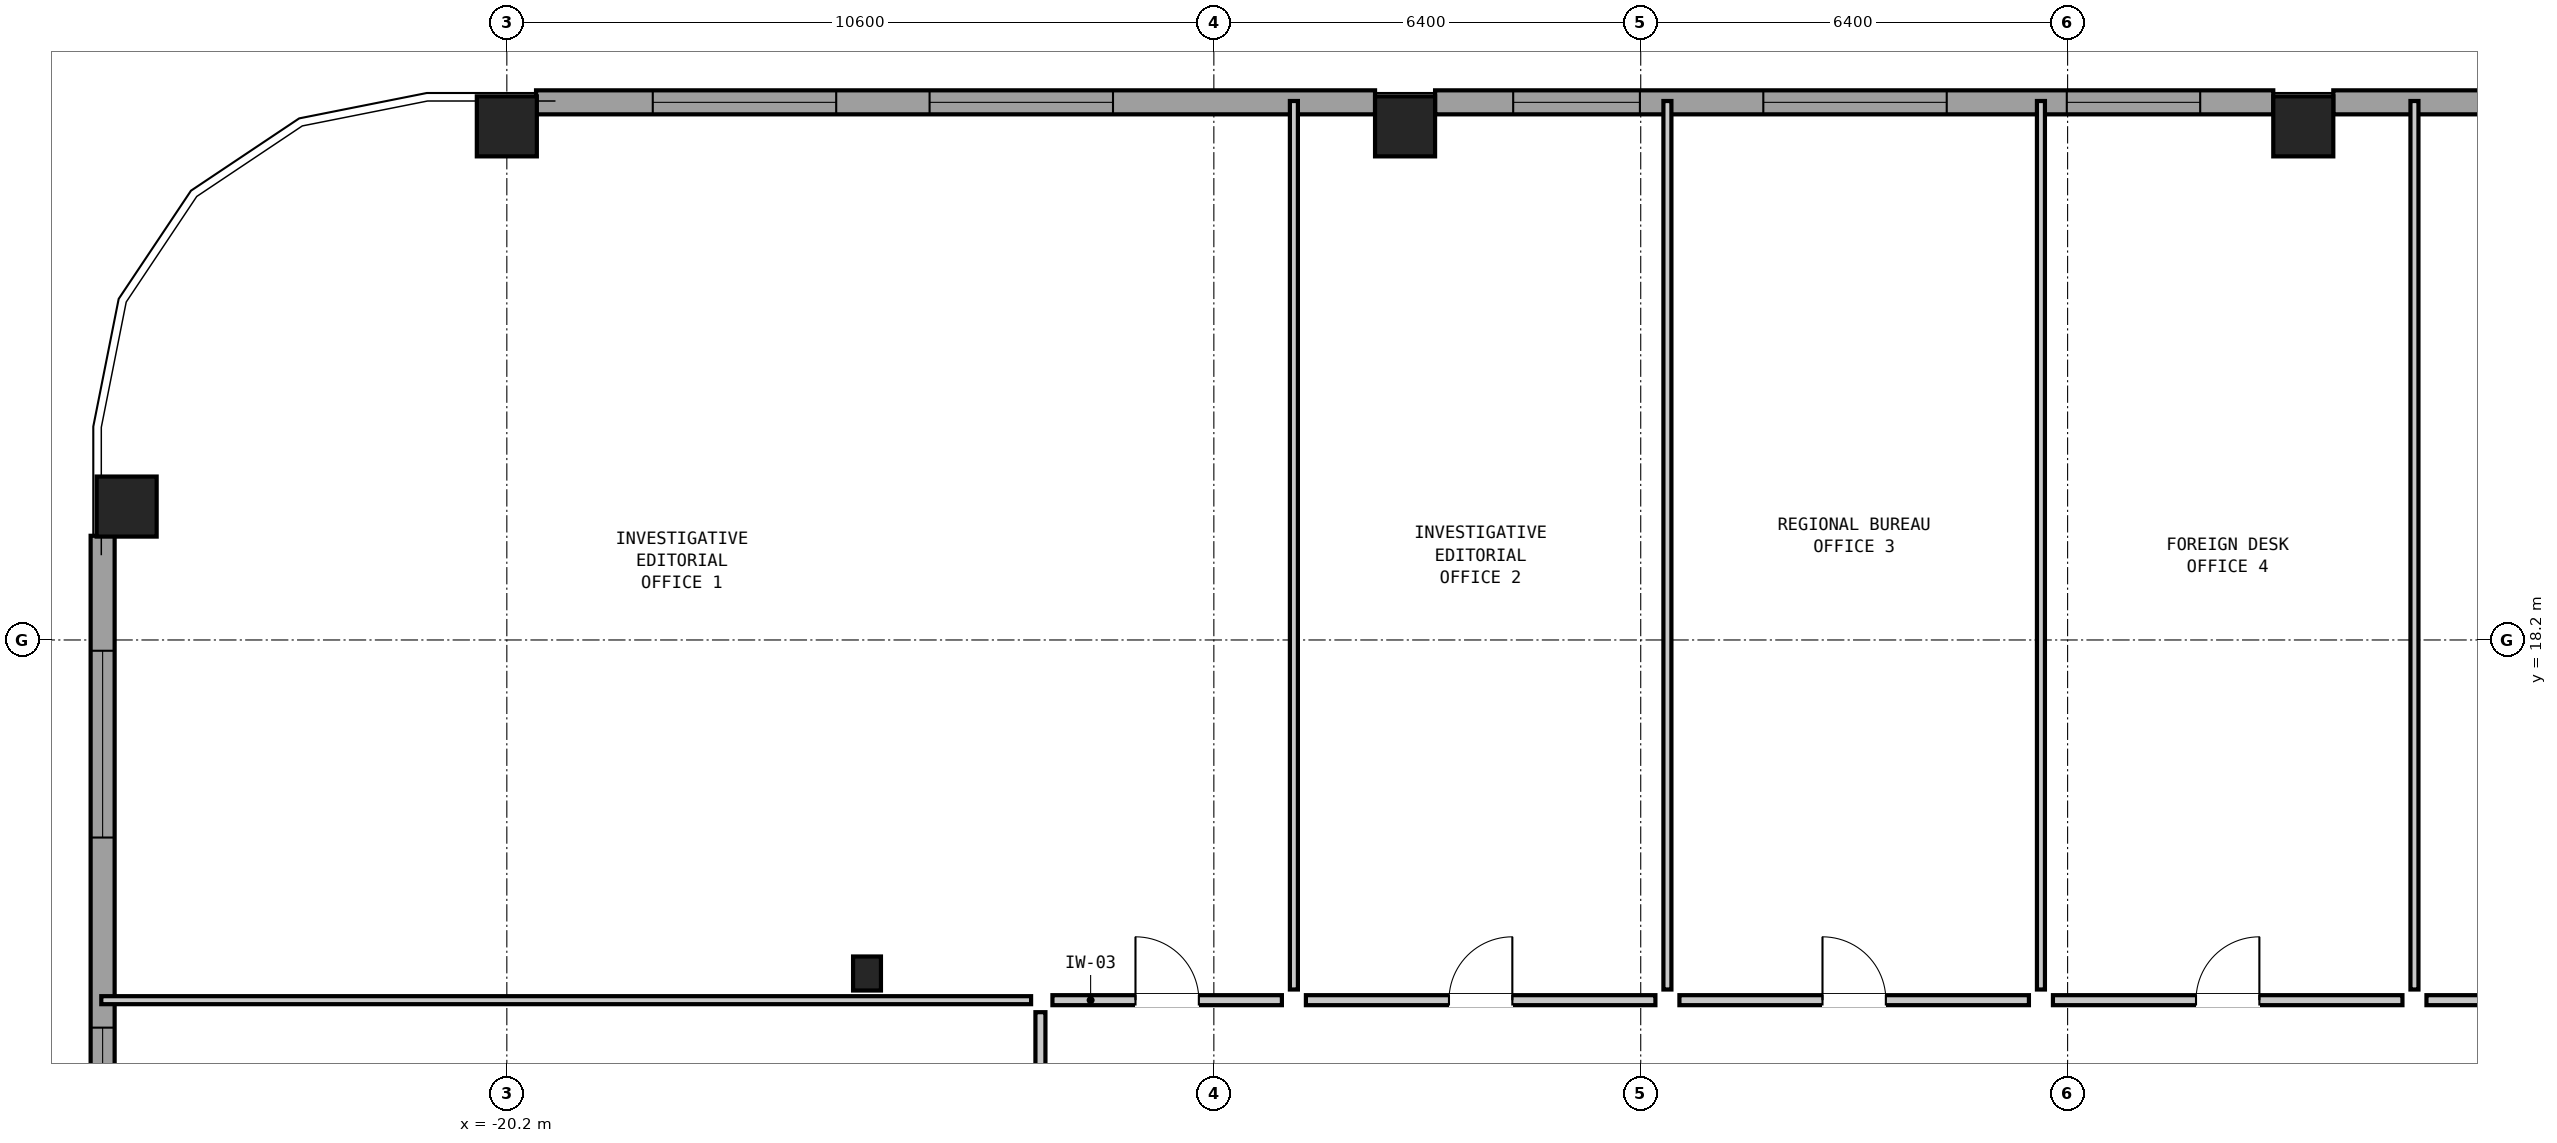
"""IFC4 building model, lengths in metres.
Left out: names, types, materials, properties, quantities, classifications, styles, units other than length and angle.
Written with IfcOpenShell. Run it as: python <this file> out.ifc"""

import sys

from ifc_helpers import new_model, si_unit, direction, frame, frame_2d, origin, origin_2d, place, context, subcontext, project, spatial, rectangle, hollow_rectangle, i_section, extrude, element, fill, save


model = new_model("IFC4")
c1 = context("Model", 3, precision=1e-05, world=origin(), true_north=direction((0.0, 1.0)))
c2 = subcontext(c1, "Body", "Model", "MODEL_VIEW")
j1 = project(units=[si_unit("LENGTHUNIT", "METRE"), si_unit("PLANEANGLEUNIT", "RADIAN")], contexts=[c1])
p1 = place(None, origin())
s1 = spatial("IfcSite", under=j1, at=p1, CompositionType="ELEMENT")
p2 = place(p1, origin())
s2 = spatial("IfcBuilding", under=s1, at=p2, CompositionType="ELEMENT")
p3 = place(p2, frame((0.0, 0.0, 35.25)))
s3 = spatial("IfcBuildingStorey", under=s2, at=p3, CompositionType="ELEMENT", Elevation=35.25)
for number, where, z_axis, x_axis in (
    (1, (6.733, 25.9, 0.0), (0.0, 0.0, 1.0), (1.0, 0.0, 0.0)),
    (2, (-6.733, 25.9, 0.0), (0.0, 0.0, 1.0), (1.0, 0.0, 0.0)),
    (3, (-20.2, 25.9, 0.0), (0.0, 0.0, 1.0), (1.0, 0.0, 0.0)),
    (4, (-25.9, 20.2, 0.0), (0.0, 0.0, 1.0), (0.0, 1.0, 0.0)),
):
    element("IfcColumn", number, at=place(p3, frame(where, z_axis=z_axis, x_axis=x_axis)), inside=s3, PredefinedType="COLUMN", context=c2, shape_type="SweptSolid", body=[
        extrude(hollow_rectangle(XDim=0.9, YDim=0.9, WallThickness=0.055, at=origin_2d()), origin(), (0.0, 0.0, 1.0), 3.05),
    ])
p4 = place(p3, frame((-14.8, 13.2, 0.0), z_axis=(0.0, 0.0, 1.0), x_axis=(1.0, 0.0, 0.0)))
e5 = element("IfcColumn", 5, at=p4, inside=s3, PredefinedType="COLUMN", context=c2, shape_type="SweptSolid", body=[
    extrude(i_section(OverallWidth=0.418, OverallDepth=0.51, WebThickness=0.042, FlangeThickness=0.068, at=origin_2d()), origin(), (0.0, 0.0, 1.0), 3.05),
])
p5 = place(p3, frame((-19.762, 26.26, 0.0), z_axis=(0.0, 0.0, 1.0), x_axis=(1.0, 0.0, 0.0)))
e6 = element("IfcWall", 6, at=p5, inside=s3, PredefinedType="SOLIDWALL", context=c2, shape_type="SweptSolid", body=[
    extrude(rectangle(XDim=12.579, YDim=0.36, at=frame_2d((6.289, 0.0))), origin(), (0.0, 0.0, 1.0), 2.067),
])
p6 = place(p5, frame((1.75, 0.0, 0.2)))
e7 = element("IfcOpeningElement", 7, at=p6, cuts=e6, PredefinedType="OPENING", context=c2, shape_type="SweptSolid", body=[
    extrude(rectangle(XDim=2.75, YDim=0.95, at=frame_2d((1.375, 0.475))), frame((0.0, 0.192, 0.0), z_axis=(0.0, -1.0, 0.0), x_axis=(1.0, 0.0, 0.0)), (0.0, 0.0, 1.0), 0.384),
])
p7 = place(p5, frame((5.9, 0.0, 0.95)))
e8 = element("IfcOpeningElement", 8, at=p7, cuts=e6, PredefinedType="OPENING", context=c2, shape_type="SweptSolid", body=[
    extrude(rectangle(XDim=2.75, YDim=0.95, at=frame_2d((1.375, 0.475))), frame((0.0, 0.192, 0.0), z_axis=(0.0, -1.0, 0.0), x_axis=(1.0, 0.0, 0.0)), (0.0, 0.0, 1.0), 0.384),
])
p8 = place(p3, frame((-6.283, 26.26, 0.0), z_axis=(0.0, 0.0, 1.0), x_axis=(1.0, 0.0, 0.0)))
e9 = element("IfcWall", 9, at=p8, inside=s3, PredefinedType="SOLIDWALL", context=c2, shape_type="SweptSolid", body=[
    extrude(rectangle(XDim=12.566, YDim=0.36, at=frame_2d((6.283, 0.0))), origin(), (0.0, 0.0, 1.0), 2.067),
])
p9 = place(p8, frame((1.171, 0.0, 0.65)))
e10 = element("IfcOpeningElement", 10, at=p9, cuts=e9, PredefinedType="OPENING", context=c2, shape_type="SweptSolid", body=[
    extrude(rectangle(XDim=1.9, YDim=1.25, at=frame_2d((0.95, 0.625))), frame((0.0, 0.192, 0.0), z_axis=(0.0, -1.0, 0.0), x_axis=(1.0, 0.0, 0.0)), (0.0, 0.0, 1.0), 0.384),
])
p10 = place(p8, frame((4.921, 0.0, 0.2)))
e11 = element("IfcOpeningElement", 11, at=p10, cuts=e9, PredefinedType="OPENING", context=c2, shape_type="SweptSolid", body=[
    extrude(rectangle(XDim=2.75, YDim=0.95, at=frame_2d((1.375, 0.475))), frame((0.0, 0.192, 0.0), z_axis=(0.0, -1.0, 0.0), x_axis=(1.0, 0.0, 0.0)), (0.0, 0.0, 1.0), 0.384),
])
p11 = place(p8, frame((9.471, 0.0, 0.7)))
e12 = element("IfcOpeningElement", 12, at=p11, cuts=e9, PredefinedType="OPENING", context=c2, shape_type="SweptSolid", body=[
    extrude(rectangle(XDim=2.0, YDim=1.2, at=frame_2d((1.0, 0.6))), frame((0.0, 0.192, 0.0), z_axis=(0.0, -1.0, 0.0), x_axis=(1.0, 0.0, 0.0)), (0.0, 0.0, 1.0), 0.384),
])
p12 = place(p3, frame((7.183, 26.26, 0.0), z_axis=(0.0, 0.0, 1.0), x_axis=(1.0, 0.0, 0.0)))
e13 = element("IfcWall", 13, at=p12, inside=s3, PredefinedType="SOLIDWALL", context=c2, shape_type="SweptSolid", body=[
    extrude(rectangle(XDim=12.579, YDim=0.36, at=frame_2d((6.289, 0.0))), origin(), (0.0, 0.0, 1.0), 2.067),
])
p13 = place(p12, frame((3.905, 0.0, 0.95)))
e14 = element("IfcOpeningElement", 14, at=p13, cuts=e13, PredefinedType="OPENING", context=c2, shape_type="SweptSolid", body=[
    extrude(rectangle(XDim=2.75, YDim=0.95, at=frame_2d((1.375, 0.475))), frame((0.0, 0.192, 0.0), z_axis=(0.0, -1.0, 0.0), x_axis=(1.0, 0.0, 0.0)), (0.0, 0.0, 1.0), 0.384),
])
p14 = place(p12, frame((8.005, 0.0, 0.2)))
e15 = element("IfcOpeningElement", 15, at=p14, cuts=e13, PredefinedType="OPENING", context=c2, shape_type="SweptSolid", body=[
    extrude(rectangle(XDim=2.9, YDim=0.9, at=frame_2d((1.45, 0.45))), frame((0.0, 0.192, 0.0), z_axis=(0.0, -1.0, 0.0), x_axis=(1.0, 0.0, 0.0)), (0.0, 0.0, 1.0), 0.384),
])
p15 = place(p3, frame((-26.26, 7.183, 0.0), z_axis=(0.0, 0.0, 1.0), x_axis=(0.0, 1.0, 0.0)))
e16 = element("IfcWall", 16, at=p15, inside=s3, PredefinedType="SOLIDWALL", context=c2, shape_type="SweptSolid", body=[
    extrude(rectangle(XDim=12.579, YDim=0.36, at=frame_2d((6.289, 0.0))), origin(), (0.0, 0.0, 1.0), 2.067),
])
p16 = place(p15, frame((0.055, 0.0, 0.2)))
e17 = element("IfcOpeningElement", 17, at=p16, cuts=e16, PredefinedType="OPENING", context=c2, shape_type="SweptSolid", body=[
    extrude(rectangle(XDim=2.25, YDim=1.15, at=frame_2d((1.125, 0.575))), frame((0.0, 0.192, 0.0), z_axis=(0.0, -1.0, 0.0), x_axis=(1.0, 0.0, 0.0)), (0.0, 0.0, 1.0), 0.384),
])
p17 = place(p15, frame((3.805, 0.0, 0.95)))
e18 = element("IfcOpeningElement", 18, at=p17, cuts=e16, PredefinedType="OPENING", context=c2, shape_type="SweptSolid", body=[
    extrude(rectangle(XDim=1.4, YDim=0.95, at=frame_2d((0.7, 0.475))), frame((0.0, 0.192, 0.0), z_axis=(0.0, -1.0, 0.0), x_axis=(1.0, 0.0, 0.0)), (0.0, 0.0, 1.0), 0.384),
])
p18 = place(p15, frame((8.055, 0.0, 0.2)))
e19 = element("IfcOpeningElement", 19, at=p18, cuts=e16, PredefinedType="OPENING", context=c2, shape_type="SweptSolid", body=[
    extrude(rectangle(XDim=2.8, YDim=1.0, at=frame_2d((1.4, 0.5))), frame((0.0, 0.192, 0.0), z_axis=(0.0, -1.0, 0.0), x_axis=(1.0, 0.0, 0.0)), (0.0, 0.0, 1.0), 0.384),
])
p19 = place(p3, frame((-26.28, 12.8, 0.0), z_axis=(0.0, 0.0, 1.0), x_axis=(1.0, 0.0, 0.0)))
e20 = element("IfcWall", 20, at=p19, inside=s3, PredefinedType="PARTITIONING", context=c2, shape_type="SweptSolid", body=[
    extrude(rectangle(XDim=13.94, YDim=0.12, at=frame_2d((6.97, 0.0))), origin(), (0.0, 0.0, 1.0), 2.83),
])
p20 = place(p3, frame((-8.4, 12.96, 0.0), z_axis=(0.0, 0.0, 1.0), x_axis=(0.0, 1.0, 0.0)))
e21 = element("IfcWall", 21, at=p20, inside=s3, PredefinedType="PARTITIONING", context=c2, shape_type="SweptSolid", body=[
    extrude(rectangle(XDim=13.32, YDim=0.12, at=frame_2d((6.66, 0.0))), origin(), (0.0, 0.0, 1.0), 2.83),
])
for number, where, z_axis, x_axis in (
    (22, (-2.8, 12.96, 0.0), (0.0, 0.0, 1.0), (0.0, 1.0, 0.0)),
    (23, (2.8, 12.96, 0.0), (0.0, 0.0, 1.0), (0.0, 1.0, 0.0)),
):
    element("IfcWall", number, at=place(p3, frame(where, z_axis=z_axis, x_axis=x_axis)), inside=s3, PredefinedType="PARTITIONING", context=c2, shape_type="SweptSolid", body=[
        extrude(rectangle(XDim=13.32, YDim=0.12, at=frame_2d((6.66, 0.0))), origin(), (0.0, 0.0, 1.0), 2.274),
    ])
p21 = place(p3, frame((8.4, 12.96, 0.0), z_axis=(0.0, 0.0, 1.0), x_axis=(0.0, 1.0, 0.0)))
e24 = element("IfcWall", 24, at=p21, inside=s3, PredefinedType="PARTITIONING", context=c2, shape_type="SweptSolid", body=[
    extrude(rectangle(XDim=13.32, YDim=0.12, at=frame_2d((6.66, 0.0))), origin(), (0.0, 0.0, 1.0), 2.83),
])
p22 = place(p3, frame((-12.02, 12.8, 0.0), z_axis=(0.0, 0.0, 1.0), x_axis=(1.0, 0.0, 0.0)))
e25 = element("IfcWall", 25, at=p22, inside=s3, PredefinedType="PARTITIONING", context=c2, shape_type="SweptSolid", body=[
    extrude(rectangle(XDim=3.44, YDim=0.15, at=frame_2d((1.72, 0.0))), origin(), (0.0, 0.0, 1.0), 2.83),
])
p23 = place(p22, frame((1.245, 0.0, 0.0)))
e26 = element("IfcOpeningElement", 26, at=p23, cuts=e25, PredefinedType="OPENING", context=c2, shape_type="SweptSolid", body=[
    extrude(rectangle(XDim=0.95, YDim=2.1, at=frame_2d((0.475, 1.05))), frame((0.0, 0.087, 0.0), z_axis=(0.0, -1.0, 0.0), x_axis=(1.0, 0.0, 0.0)), (0.0, 0.0, 1.0), 0.174),
])
p24 = place(p3, frame((-8.22, 12.8, 0.0), z_axis=(0.0, 0.0, 1.0), x_axis=(1.0, 0.0, 0.0)))
e27 = element("IfcWall", 27, at=p24, inside=s3, PredefinedType="PARTITIONING", context=c2, shape_type="SweptSolid", body=[
    extrude(rectangle(XDim=5.24, YDim=0.15, at=frame_2d((2.62, 0.0))), origin(), (0.0, 0.0, 1.0), 2.83),
])
p25 = place(p24, frame((2.145, 0.0, 0.0)))
e28 = element("IfcOpeningElement", 28, at=p25, cuts=e27, PredefinedType="OPENING", context=c2, shape_type="SweptSolid", body=[
    extrude(rectangle(XDim=0.95, YDim=2.1, at=frame_2d((0.475, 1.05))), frame((0.0, 0.087, 0.0), z_axis=(0.0, -1.0, 0.0), x_axis=(1.0, 0.0, 0.0)), (0.0, 0.0, 1.0), 0.174),
])
p26 = place(p3, frame((-2.62, 12.8, 0.0), z_axis=(0.0, 0.0, 1.0), x_axis=(1.0, 0.0, 0.0)))
e29 = element("IfcWall", 29, at=p26, inside=s3, PredefinedType="PARTITIONING", context=c2, shape_type="SweptSolid", body=[
    extrude(rectangle(XDim=5.24, YDim=0.15, at=frame_2d((2.62, 0.0))), origin(), (0.0, 0.0, 1.0), 2.83),
])
p27 = place(p26, frame((2.145, 0.0, 0.0)))
e30 = element("IfcOpeningElement", 30, at=p27, cuts=e29, PredefinedType="OPENING", context=c2, shape_type="SweptSolid", body=[
    extrude(rectangle(XDim=0.95, YDim=2.1, at=frame_2d((0.475, 1.05))), frame((0.0, 0.087, 0.0), z_axis=(0.0, -1.0, 0.0), x_axis=(1.0, 0.0, 0.0)), (0.0, 0.0, 1.0), 0.174),
])
p28 = place(p3, frame((2.98, 12.8, 0.0), z_axis=(0.0, 0.0, 1.0), x_axis=(1.0, 0.0, 0.0)))
e31 = element("IfcWall", 31, at=p28, inside=s3, PredefinedType="PARTITIONING", context=c2, shape_type="SweptSolid", body=[
    extrude(rectangle(XDim=5.24, YDim=0.15, at=frame_2d((2.62, 0.0))), origin(), (0.0, 0.0, 1.0), 2.83),
])
p29 = place(p28, frame((2.145, 0.0, 0.0)))
e32 = element("IfcOpeningElement", 32, at=p29, cuts=e31, PredefinedType="OPENING", context=c2, shape_type="SweptSolid", body=[
    extrude(rectangle(XDim=0.95, YDim=2.1, at=frame_2d((0.475, 1.05))), frame((0.0, 0.087, 0.0), z_axis=(0.0, -1.0, 0.0), x_axis=(1.0, 0.0, 0.0)), (0.0, 0.0, 1.0), 0.174),
])
p30 = place(p3, frame((8.58, 12.8, 0.0), z_axis=(0.0, 0.0, 1.0), x_axis=(1.0, 0.0, 0.0)))
e33 = element("IfcWall", 33, at=p30, inside=s3, PredefinedType="PARTITIONING", context=c2, shape_type="SweptSolid", body=[
    extrude(rectangle(XDim=3.44, YDim=0.15, at=frame_2d((1.72, 0.0))), origin(), (0.0, 0.0, 1.0), 2.83),
])
p31 = place(p30, frame((1.245, 0.0, 0.0)))
e34 = element("IfcOpeningElement", 34, at=p31, cuts=e33, PredefinedType="OPENING", context=c2, shape_type="SweptSolid", body=[
    extrude(rectangle(XDim=0.95, YDim=2.1, at=frame_2d((0.475, 1.05))), frame((0.0, 0.087, 0.0), z_axis=(0.0, -1.0, 0.0), x_axis=(1.0, 0.0, 0.0)), (0.0, 0.0, 1.0), 0.174),
])
p32 = place(p3, frame((-12.2, 0.18, 0.0), z_axis=(0.0, 0.0, 1.0), x_axis=(0.0, 1.0, 0.0)))
e35 = element("IfcWall", 35, at=p32, inside=s3, PredefinedType="PARTITIONING", context=c2, shape_type="SweptSolid", body=[
    extrude(rectangle(XDim=12.44, YDim=0.15, at=frame_2d((6.22, 0.0))), origin(), (0.0, 0.0, 1.0), 2.83),
])
p33 = place(p32, frame((5.745, 0.0, 0.0)))
e36 = element("IfcOpeningElement", 36, at=p33, cuts=e35, PredefinedType="OPENING", context=c2, shape_type="SweptSolid", body=[
    extrude(rectangle(XDim=0.95, YDim=2.1, at=frame_2d((0.475, 1.05))), frame((0.0, 0.087, 0.0), z_axis=(0.0, -1.0, 0.0), x_axis=(1.0, 0.0, 0.0)), (0.0, 0.0, 1.0), 0.174),
])
p34 = place(p6, origin())
e37 = element("IfcWindow", 37, at=p34, inside=s3, PartitioningType="SINGLE_PANEL", PredefinedType="WINDOW", context=c2, shape_type="SweptSolid", body=[
    extrude(rectangle(XDim=2.75, YDim=0.95, at=frame_2d((1.375, 0.475))), frame((0.0, 0.03, 0.0), z_axis=(0.0, -1.0, 0.0), x_axis=(1.0, 0.0, 0.0)), (0.0, 0.0, 1.0), 0.06),
])
fill(e7, e37)
p35 = place(p7, origin())
e38 = element("IfcWindow", 38, at=p35, inside=s3, PartitioningType="SINGLE_PANEL", PredefinedType="WINDOW", context=c2, shape_type="SweptSolid", body=[
    extrude(rectangle(XDim=2.75, YDim=0.95, at=frame_2d((1.375, 0.475))), frame((0.0, 0.03, 0.0), z_axis=(0.0, -1.0, 0.0), x_axis=(1.0, 0.0, 0.0)), (0.0, 0.0, 1.0), 0.06),
])
fill(e8, e38)
p36 = place(p9, origin())
e39 = element("IfcWindow", 39, at=p36, inside=s3, PartitioningType="SINGLE_PANEL", PredefinedType="WINDOW", context=c2, shape_type="SweptSolid", body=[
    extrude(rectangle(XDim=1.9, YDim=1.25, at=frame_2d((0.95, 0.625))), frame((0.0, 0.03, 0.0), z_axis=(0.0, -1.0, 0.0), x_axis=(1.0, 0.0, 0.0)), (0.0, 0.0, 1.0), 0.06),
])
fill(e10, e39)
p37 = place(p10, origin())
e40 = element("IfcWindow", 40, at=p37, inside=s3, PartitioningType="SINGLE_PANEL", PredefinedType="WINDOW", context=c2, shape_type="SweptSolid", body=[
    extrude(rectangle(XDim=2.75, YDim=0.95, at=frame_2d((1.375, 0.475))), frame((0.0, 0.03, 0.0), z_axis=(0.0, -1.0, 0.0), x_axis=(1.0, 0.0, 0.0)), (0.0, 0.0, 1.0), 0.06),
])
fill(e11, e40)
p38 = place(p11, origin())
e41 = element("IfcWindow", 41, at=p38, inside=s3, PartitioningType="SINGLE_PANEL", PredefinedType="WINDOW", context=c2, shape_type="SweptSolid", body=[
    extrude(rectangle(XDim=2.0, YDim=1.2, at=frame_2d((1.0, 0.6))), frame((0.0, 0.03, 0.0), z_axis=(0.0, -1.0, 0.0), x_axis=(1.0, 0.0, 0.0)), (0.0, 0.0, 1.0), 0.06),
])
fill(e12, e41)
p39 = place(p17, origin())
e42 = element("IfcWindow", 42, at=p39, inside=s3, PartitioningType="SINGLE_PANEL", PredefinedType="WINDOW", context=c2, shape_type="SweptSolid", body=[
    extrude(rectangle(XDim=1.4, YDim=0.95, at=frame_2d((0.7, 0.475))), frame((0.0, 0.03, 0.0), z_axis=(0.0, -1.0, 0.0), x_axis=(1.0, 0.0, 0.0)), (0.0, 0.0, 1.0), 0.06),
])
fill(e18, e42)
p40 = place(p18, origin())
e43 = element("IfcWindow", 43, at=p40, inside=s3, PartitioningType="SINGLE_PANEL", PredefinedType="WINDOW", context=c2, shape_type="SweptSolid", body=[
    extrude(rectangle(XDim=2.8, YDim=1.0, at=frame_2d((1.4, 0.5))), frame((0.0, 0.03, 0.0), z_axis=(0.0, -1.0, 0.0), x_axis=(1.0, 0.0, 0.0)), (0.0, 0.0, 1.0), 0.06),
])
fill(e19, e43)
p41 = place(p23, origin())
e44 = element("IfcDoor", 44, at=p41, inside=s3, OperationType="SINGLE_SWING_LEFT", PredefinedType="DOOR", context=c2, shape_type="SweptSolid", body=[
    extrude(rectangle(XDim=0.95, YDim=2.1, at=frame_2d((0.475, 1.05))), frame((0.0, 0.025, 0.0), z_axis=(0.0, -1.0, 0.0), x_axis=(1.0, 0.0, 0.0)), (0.0, 0.0, 1.0), 0.05),
])
fill(e26, e44)
p42 = place(p25, origin())
e45 = element("IfcDoor", 45, at=p42, inside=s3, OperationType="SINGLE_SWING_RIGHT", PredefinedType="DOOR", context=c2, shape_type="SweptSolid", body=[
    extrude(rectangle(XDim=0.95, YDim=2.1, at=frame_2d((0.475, 1.05))), frame((0.0, 0.025, 0.0), z_axis=(0.0, -1.0, 0.0), x_axis=(1.0, 0.0, 0.0)), (0.0, 0.0, 1.0), 0.05),
])
fill(e28, e45)
p43 = place(p27, origin())
e46 = element("IfcDoor", 46, at=p43, inside=s3, OperationType="SINGLE_SWING_LEFT", PredefinedType="DOOR", context=c2, shape_type="SweptSolid", body=[
    extrude(rectangle(XDim=0.95, YDim=2.1, at=frame_2d((0.475, 1.05))), frame((0.0, 0.025, 0.0), z_axis=(0.0, -1.0, 0.0), x_axis=(1.0, 0.0, 0.0)), (0.0, 0.0, 1.0), 0.05),
])
fill(e30, e46)
p44 = place(p29, origin())
e47 = element("IfcDoor", 47, at=p44, inside=s3, OperationType="SINGLE_SWING_RIGHT", PredefinedType="DOOR", context=c2, shape_type="SweptSolid", body=[
    extrude(rectangle(XDim=0.95, YDim=2.1, at=frame_2d((0.475, 1.05))), frame((0.0, 0.025, 0.0), z_axis=(0.0, -1.0, 0.0), x_axis=(1.0, 0.0, 0.0)), (0.0, 0.0, 1.0), 0.05),
])
fill(e32, e47)
save(model, sys.argv[1])
